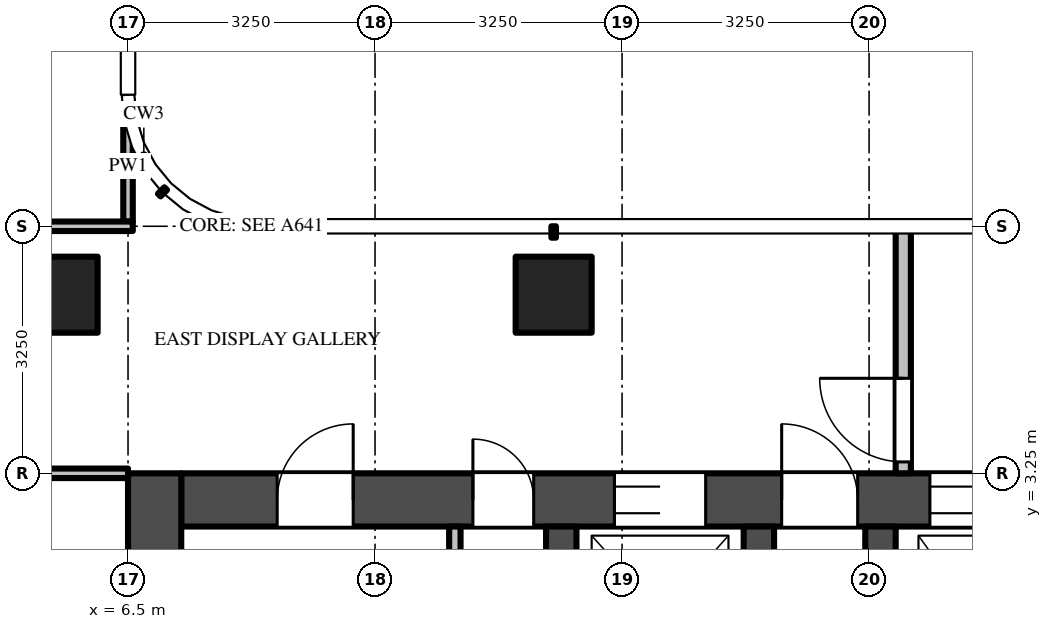
"""IFC4 building model, lengths in metres.
Left out: names, types, materials, properties, quantities, classifications, styles, units other than length and angle.
Written with IfcOpenShell. Run it as: python <this file> out.ifc"""

import sys

from ifc_helpers import new_model, si_unit, direction, frame, frame_2d, origin, origin_2d, place, context, subcontext, project, spatial, rectangle, extrude, source, transform, mapped, element, fill, save


model = new_model("IFC4")
c1 = context("Model", 3, precision=1e-05, world=origin(), true_north=direction((0.0, 1.0)))
c2 = subcontext(c1, "Body", "Model", "MODEL_VIEW")
j1 = project(units=[si_unit("LENGTHUNIT", "METRE"), si_unit("PLANEANGLEUNIT", "RADIAN")], contexts=[c1])
p1 = place(None, origin())
s1 = spatial("IfcSite", under=j1, at=p1, CompositionType="ELEMENT")
p2 = place(p1, origin())
s2 = spatial("IfcBuilding", under=s1, at=p2, CompositionType="ELEMENT")
p3 = place(p2, frame((0.0, 0.0, 314.5)))
s3 = spatial("IfcBuildingStorey", under=s2, at=p3, CompositionType="ELEMENT", Elevation=314.5)
m1 = source(origin(), c2, "Body", "SweptSolid", [
    extrude(rectangle(XDim=1.0, YDim=1.0, at=origin_2d()), origin(), (0.0, 0.0, 1.0), 3.9),
])
for number, where, z_axis, x_axis in (
    (1, (12.1, 5.6, 0.0), (0.0, 0.0, 1.0), (1.0, 0.0, 0.0)),
    (2, (5.6, 5.6, 0.0), (0.0, 0.0, 1.0), (1.0, 0.0, 0.0)),
):
    element("IfcColumn", number, at=place(p3, frame(where, z_axis=z_axis, x_axis=x_axis)), inside=s3, PredefinedType="COLUMN", context=c2, shape_type="MappedRepresentation", body=[
        mapped(m1, transform((0.0, 0.0, 0.0))),
    ])
m2 = source(origin(), c2, "Body", "SweptSolid", [
    extrude(rectangle(XDim=14.85, YDim=0.7, at=frame_2d((7.425, 0.0))), origin(), (0.0, 0.0, 1.0), 3.7),
])
p4 = place(p3, frame((7.2, 2.9, 0.0), z_axis=(0.0, 0.0, 1.0), x_axis=(1.0, 0.0, 0.0)))
e3 = element("IfcWall", 3, at=p4, inside=s3, PredefinedType="SHEAR", context=c2, shape_type="MappedRepresentation", body=[
    mapped(m2, transform((0.0, 0.0, 0.0))),
])
m3 = source(origin(), c2, "Body", "SweptSolid", [
    extrude(rectangle(XDim=1.2, YDim=2.1, at=frame_2d((0.6, 1.05))), frame((0.0, 0.36, 0.0), z_axis=(0.0, -1.0, 0.0), x_axis=(1.0, 0.0, 0.0)), (0.0, 0.0, 1.0), 0.72),
])
p5 = place(p4, frame((5.7, 0.0, 0.0)))
e4 = element("IfcOpeningElement", 4, at=p5, cuts=e3, PredefinedType="OPENING", context=c2, shape_type="MappedRepresentation", body=[
    mapped(m3, transform((0.0, 0.0, 0.0))),
])
m4 = source(origin(), c2, "Body", "SweptSolid", [
    extrude(rectangle(XDim=1.3, YDim=2.1, at=frame_2d((0.65, 1.05))), frame((0.0, 0.36, 0.0), z_axis=(0.0, -1.0, 0.0), x_axis=(1.0, 0.0, 0.0)), (0.0, 0.0, 1.0), 0.72),
])
p6 = place(p4, frame((12.2, 0.0, 0.0)))
e5 = element("IfcOpeningElement", 5, at=p6, cuts=e3, PredefinedType="OPENING", context=c2, shape_type="MappedRepresentation", body=[
    mapped(m4, transform((0.0, 0.0, 0.0))),
])
p7 = place(p4, frame((9.85, 0.0, 0.0)))
e6 = element("IfcOpeningElement", 6, at=p7, cuts=e3, PredefinedType="OPENING", context=c2, shape_type="MappedRepresentation", body=[
    mapped(m3, transform((0.0, 0.0, 0.0))),
])
m5 = source(origin(), c2, "Body", "SweptSolid", [
    extrude(rectangle(XDim=1.0, YDim=2.1, at=frame_2d((0.5, 1.05))), frame((0.0, 0.36, 0.0), z_axis=(0.0, -1.0, 0.0), x_axis=(1.0, 0.0, 0.0)), (0.0, 0.0, 1.0), 0.72),
])
p8 = place(p4, frame((7.9, 0.0, 0.0)))
e7 = element("IfcOpeningElement", 7, at=p8, cuts=e3, PredefinedType="OPENING", context=c2, shape_type="MappedRepresentation", body=[
    mapped(m5, transform((0.0, 0.0, 0.0))),
])
p9 = place(p4, frame((1.262, 0.0, 0.0)))
e8 = element("IfcOpeningElement", 8, at=p9, cuts=e3, PredefinedType="OPENING", context=c2, shape_type="MappedRepresentation", body=[
    mapped(m5, transform((0.0, 0.0, 0.0))),
])
m6 = source(origin(), c2, "Body", "SweptSolid", [
    extrude(rectangle(XDim=0.8, YDim=2.1, at=frame_2d((0.4, 1.05))), frame((0.0, 0.36, 0.0), z_axis=(0.0, -1.0, 0.0), x_axis=(1.0, 0.0, 0.0)), (0.0, 0.0, 1.0), 0.72),
])
p10 = place(p4, frame((3.837, 0.0, 0.0)))
e9 = element("IfcOpeningElement", 9, at=p10, cuts=e3, PredefinedType="OPENING", context=c2, shape_type="MappedRepresentation", body=[
    mapped(m6, transform((0.0, 0.0, 0.0))),
])
m7 = source(origin(), c2, "Body", "SweptSolid", [
    extrude(rectangle(XDim=9.05, YDim=0.7, at=frame_2d((4.525, 0.0))), origin(), (0.0, 0.0, 1.0), 3.7),
])
p11 = place(p3, frame((6.85, -5.8, 0.0), z_axis=(0.0, 0.0, 1.0), x_axis=(0.0, 1.0, 0.0)))
e10 = element("IfcWall", 10, at=p11, inside=s3, PredefinedType="SHEAR", context=c2, shape_type="MappedRepresentation", body=[
    mapped(m7, transform((0.0, 0.0, 0.0))),
])
m8 = source(origin(), c2, "Body", "SweptSolid", [
    extrude(rectangle(XDim=1.8, YDim=2.1, at=frame_2d((0.9, 1.05))), frame((0.0, 0.36, 0.0), z_axis=(0.0, -1.0, 0.0), x_axis=(1.0, 0.0, 0.0)), (0.0, 0.0, 1.0), 0.72),
])
p12 = place(p11, frame((3.15, 0.0, 0.0)))
e11 = element("IfcOpeningElement", 11, at=p12, cuts=e10, PredefinedType="OPENING", context=c2, shape_type="MappedRepresentation", body=[
    mapped(m8, transform((0.0, 0.0, 0.0))),
])
m9 = source(origin(), c2, "Body", "SweptSolid", [
    extrude(rectangle(XDim=2.45, YDim=0.4, at=frame_2d((1.225, 0.0))), origin(), (0.0, 0.0, 1.0), 3.7),
])
for number, where, z_axis, x_axis in (
    (12, (12.2, 0.1, 0.0), (0.0, 0.0, 1.0), (0.0, 1.0, 0.0)),
    (13, (14.8, 0.1, 0.0), (0.0, 0.0, 1.0), (0.0, 1.0, 0.0)),
    (14, (16.4, 0.1, 0.0), (0.0, 0.0, 1.0), (0.0, 1.0, 0.0)),
):
    element("IfcWall", number, at=place(p3, frame(where, z_axis=z_axis, x_axis=x_axis)), inside=s3, PredefinedType="SHEAR", context=c2, shape_type="MappedRepresentation", body=[
        mapped(m9, transform((0.0, 0.0, 0.0))),
    ])
m10 = source(origin(), c2, "Body", "SweptSolid", [
    extrude(rectangle(XDim=3.25, YDim=0.2, at=frame_2d((1.625, 0.0))), origin(), (0.0, 0.0, 1.0), 3.7),
])
p13 = place(p3, frame((16.7, 3.25, 0.0), z_axis=(0.0, 0.0, 1.0), x_axis=(0.0, 1.0, 0.0)))
e15 = element("IfcWall", 15, at=p13, inside=s3, PredefinedType="PARTITIONING", context=c2, shape_type="MappedRepresentation", body=[
    mapped(m10, transform((0.0, 0.0, 0.0))),
])
m11 = source(origin(), c2, "Body", "SweptSolid", [
    extrude(rectangle(XDim=1.1, YDim=2.1, at=frame_2d((0.55, 1.05))), frame((0.0, 0.11, 0.0), z_axis=(0.0, -1.0, 0.0), x_axis=(1.0, 0.0, 0.0)), (0.0, 0.0, 1.0), 0.22),
])
p14 = place(p13, frame((0.15, 0.0, 0.0)))
e16 = element("IfcOpeningElement", 16, at=p14, cuts=e15, PredefinedType="OPENING", context=c2, shape_type="MappedRepresentation", body=[
    mapped(m11, transform((0.0, 0.0, 0.0))),
])
m12 = source(origin(), c2, "Body", "SweptSolid", [
    extrude(rectangle(XDim=2.45, YDim=0.15, at=frame_2d((1.225, 0.0))), origin(), (0.0, 0.0, 1.0), 3.7),
])
p15 = place(p3, frame((10.8, 0.1, 0.0), z_axis=(0.0, 0.0, 1.0), x_axis=(0.0, 1.0, 0.0)))
e17 = element("IfcWall", 17, at=p15, inside=s3, PredefinedType="PARTITIONING", context=c2, shape_type="MappedRepresentation", body=[
    mapped(m12, transform((0.0, 0.0, 0.0))),
])
m13 = source(origin(), c2, "Body", "SweptSolid", [
    extrude(rectangle(XDim=1.469, YDim=0.125, at=frame_2d((0.734, 0.0))), origin(), (0.0, 0.0, 1.0), 3.7),
])
p16 = place(p3, frame((6.5, 6.562, 0.0), z_axis=(0.0, 0.0, 1.0), x_axis=(0.0, 1.0, 0.0)))
e18 = element("IfcWall", 18, at=p16, inside=s3, PredefinedType="PARTITIONING", context=c2, shape_type="MappedRepresentation", body=[
    mapped(m13, transform((0.0, 0.0, 0.0))),
])
m14 = source(origin(), c2, "Body", "SweptSolid", [
    extrude(rectangle(XDim=5.363, YDim=0.125, at=frame_2d((2.681, 0.0))), origin(), (0.0, 0.0, 1.0), 2.997),
])
p17 = place(p3, frame((1.137, 3.25, 0.0), z_axis=(0.0, 0.0, 1.0), x_axis=(1.0, 0.0, 0.0)))
e19 = element("IfcWall", 19, at=p17, inside=s3, PredefinedType="PARTITIONING", context=c2, shape_type="MappedRepresentation", body=[
    mapped(m14, transform((0.0, 0.0, 0.0))),
])
m15 = source(origin(), c2, "Body", "SweptSolid", [
    extrude(rectangle(XDim=3.725, YDim=0.125, at=frame_2d((1.863, 0.0))), origin(), (0.0, 0.0, 1.0), 2.78),
])
p18 = place(p3, frame((2.837, 6.5, 0.0), z_axis=(0.0, 0.0, 1.0), x_axis=(1.0, 0.0, 0.0)))
e20 = element("IfcWall", 20, at=p18, inside=s3, PredefinedType="PARTITIONING", context=c2, shape_type="MappedRepresentation", body=[
    mapped(m15, transform((0.0, 0.0, 0.0))),
])
m16 = source(origin(), c2, "Body", "SweptSolid", [
    extrude(rectangle(XDim=1.2, YDim=2.1, at=frame_2d((0.6, 1.05))), frame((0.0, -0.275, 0.0), z_axis=(0.0, -1.0, 0.0), x_axis=(1.0, 0.0, 0.0)), (0.0, 0.0, 1.0), 0.05),
])
p19 = place(p5, origin())
e21 = element("IfcDoor", 21, at=p19, inside=s3, OperationType="DOUBLE_DOOR_SLIDING", PredefinedType="DOOR", context=c2, shape_type="MappedRepresentation", body=[
    mapped(m16, transform((0.0, 0.0, 0.0))),
])
fill(e4, e21)
p20 = place(p7, origin())
e22 = element("IfcDoor", 22, at=p20, inside=s3, OperationType="DOUBLE_DOOR_SLIDING", PredefinedType="DOOR", context=c2, shape_type="MappedRepresentation", body=[
    mapped(m16, transform((0.0, 0.0, 0.0))),
])
fill(e6, e22)
m17 = source(origin(), c2, "Body", "SweptSolid", [
    extrude(rectangle(XDim=1.0, YDim=2.1, at=frame_2d((0.5, 1.05))), frame((0.0, -0.275, 0.0), z_axis=(0.0, -1.0, 0.0), x_axis=(1.0, 0.0, 0.0)), (0.0, 0.0, 1.0), 0.05),
])
p21 = place(p8, origin())
e23 = element("IfcDoor", 23, at=p21, inside=s3, OperationType="SINGLE_SWING_LEFT", PredefinedType="DOOR", context=c2, shape_type="MappedRepresentation", body=[
    mapped(m17, transform((0.0, 0.0, 0.0))),
])
fill(e7, e23)
m18 = source(origin(), c2, "Body", "SweptSolid", [
    extrude(rectangle(XDim=1.1, YDim=2.1, at=frame_2d((0.55, 1.05))), frame((0.0, 0.025, 0.0), z_axis=(0.0, -1.0, 0.0), x_axis=(1.0, 0.0, 0.0)), (0.0, 0.0, 1.0), 0.05),
])
p22 = place(p14, origin())
e24 = element("IfcDoor", 24, at=p22, inside=s3, OperationType="SINGLE_SWING_RIGHT", PredefinedType="DOOR", context=c2, shape_type="MappedRepresentation", body=[
    mapped(m18, transform((0.0, 0.0, 0.0))),
])
fill(e16, e24)
p23 = place(p9, origin())
e25 = element("IfcDoor", 25, at=p23, inside=s3, OperationType="SINGLE_SWING_RIGHT", PredefinedType="DOOR", context=c2, shape_type="MappedRepresentation", body=[
    mapped(m17, transform((0.0, 0.0, 0.0))),
])
fill(e8, e25)
m19 = source(origin(), c2, "Body", "SweptSolid", [
    extrude(rectangle(XDim=0.8, YDim=2.1, at=frame_2d((0.4, 1.05))), frame((0.0, -0.275, 0.0), z_axis=(0.0, -1.0, 0.0), x_axis=(1.0, 0.0, 0.0)), (0.0, 0.0, 1.0), 0.05),
])
p24 = place(p10, origin())
e26 = element("IfcDoor", 26, at=p24, inside=s3, OperationType="SINGLE_SWING_LEFT", PredefinedType="DOOR", context=c2, shape_type="MappedRepresentation", body=[
    mapped(m19, transform((0.0, 0.0, 0.0))),
])
fill(e9, e26)
save(model, sys.argv[1])
